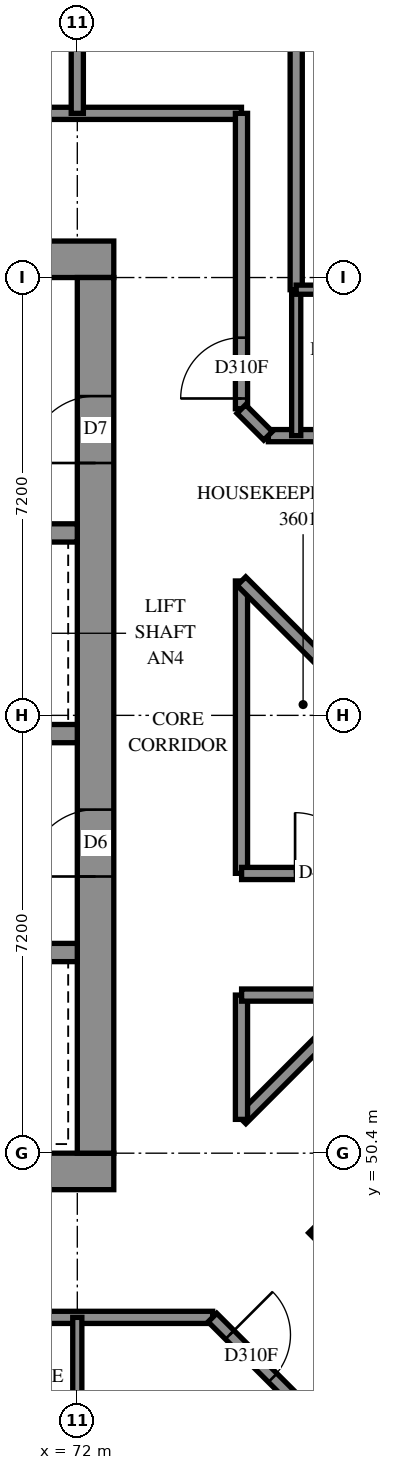
"""IFC4 building model, lengths in metres.
Left out: names, types, materials, properties, quantities, classifications, styles, units other than length and angle.
Written with IfcOpenShell. Run it as: python <this file> out.ifc"""

import sys

from ifc_helpers import new_model, si_unit, direction, frame, frame_2d, origin, place, context, subcontext, project, spatial, rectangle, extrude, element, fill, save


model = new_model("IFC4")
c1 = context("Model", 3, precision=1e-05, world=origin(), true_north=direction((0.0, 1.0)))
c2 = subcontext(c1, "Body", "Model", "MODEL_VIEW")
j1 = project(units=[si_unit("LENGTHUNIT", "METRE"), si_unit("PLANEANGLEUNIT", "RADIAN")], contexts=[c1])
p1 = place(None, origin())
s1 = spatial("IfcSite", under=j1, at=p1, CompositionType="ELEMENT")
p2 = place(p1, origin())
s2 = spatial("IfcBuilding", under=s1, at=p2, CompositionType="ELEMENT")
p3 = place(p2, frame((0.0, 0.0, 135.4)))
s3 = spatial("IfcBuildingStorey", under=s2, at=p3, CompositionType="ELEMENT", Elevation=135.4)
p4 = place(p3, frame((57.0, 50.1, -0.3), z_axis=(0.0, 0.0, 1.0), x_axis=(1.0, 0.0, 0.0)))
e1 = element("IfcWall", 1, at=p4, inside=s3, PredefinedType="SHEAR", context=c2, shape_type="SweptSolid", body=[
    extrude(rectangle(XDim=15.6, YDim=0.6, at=frame_2d((7.8, 0.0))), origin(), (0.0, 0.0, 1.0), 2.7),
])
p5 = place(p3, frame((57.0, 65.1, -0.3), z_axis=(0.0, 0.0, 1.0), x_axis=(1.0, 0.0, 0.0)))
e2 = element("IfcWall", 2, at=p5, inside=s3, PredefinedType="SHEAR", context=c2, shape_type="SweptSolid", body=[
    extrude(rectangle(XDim=15.6, YDim=0.6, at=frame_2d((7.8, 0.0))), origin(), (0.0, 0.0, 1.0), 2.7),
])
p6 = place(p5, frame((10.6, 0.0, 0.3)))
e3 = element("IfcOpeningElement", 3, at=p6, cuts=e2, PredefinedType="OPENING", context=c2, shape_type="SweptSolid", body=[
    extrude(rectangle(XDim=0.8, YDim=2.1, at=frame_2d((0.4, 1.05))), frame((0.0, 0.31, 0.0), z_axis=(0.0, -1.0, 0.0), x_axis=(1.0, 0.0, 0.0)), (0.0, 0.0, 1.0), 0.62),
])
p7 = place(p3, frame((72.3, 50.4, -0.3), z_axis=(0.0, 0.0, 1.0), x_axis=(0.0, 1.0, 0.0)))
e4 = element("IfcWall", 4, at=p7, inside=s3, PredefinedType="SHEAR", context=c2, shape_type="SweptSolid", body=[
    extrude(rectangle(XDim=14.4, YDim=0.6, at=frame_2d((7.2, 0.0))), origin(), (0.0, 0.0, 1.0), 2.7),
])
p8 = place(p7, frame((4.55, 0.0, 0.3)))
e5 = element("IfcOpeningElement", 5, at=p8, cuts=e4, PredefinedType="OPENING", context=c2, shape_type="SweptSolid", body=[
    extrude(rectangle(XDim=1.1, YDim=2.1, at=frame_2d((0.55, 1.05))), frame((0.0, 0.31, 0.0), z_axis=(0.0, -1.0, 0.0), x_axis=(1.0, 0.0, 0.0)), (0.0, 0.0, 1.0), 0.62),
])
p9 = place(p7, frame((11.35, 0.0, 0.3)))
e6 = element("IfcOpeningElement", 6, at=p9, cuts=e4, PredefinedType="OPENING", context=c2, shape_type="SweptSolid", body=[
    extrude(rectangle(XDim=1.1, YDim=2.1, at=frame_2d((0.55, 1.05))), frame((0.0, 0.31, 0.0), z_axis=(0.0, -1.0, 0.0), x_axis=(1.0, 0.0, 0.0)), (0.0, 0.0, 1.0), 0.62),
])
p10 = place(p3, frame((57.6, 53.7, 0.0), z_axis=(0.0, 0.0, 1.0), x_axis=(1.0, 0.0, 0.0)))
e7 = element("IfcWall", 7, at=p10, inside=s3, PredefinedType="SOLIDWALL", context=c2, shape_type="SweptSolid", body=[
    extrude(rectangle(XDim=14.4, YDim=0.3, at=frame_2d((7.2, 0.0))), origin(), (0.0, 0.0, 1.0), 3.1),
])
p11 = place(p10, frame((12.05, 0.0, 0.0)))
e8 = element("IfcOpeningElement", 8, at=p11, cuts=e7, PredefinedType="OPENING", context=c2, shape_type="SweptSolid", body=[
    extrude(rectangle(XDim=1.1, YDim=2.1, at=frame_2d((0.55, 1.05))), frame((0.0, 0.16, 0.0), z_axis=(0.0, -1.0, 0.0), x_axis=(1.0, 0.0, 0.0)), (0.0, 0.0, 1.0), 0.32),
])
p12 = place(p3, frame((57.6, 57.3, 0.0), z_axis=(0.0, 0.0, 1.0), x_axis=(1.0, 0.0, 0.0)))
e9 = element("IfcWall", 9, at=p12, inside=s3, PredefinedType="SOLIDWALL", context=c2, shape_type="SweptSolid", body=[
    extrude(rectangle(XDim=14.4, YDim=0.3, at=frame_2d((7.2, 0.0))), origin(), (0.0, 0.0, 1.0), 3.1),
])
p13 = place(p12, frame((1.25, 0.0, 0.0)))
e10 = element("IfcOpeningElement", 10, at=p13, cuts=e9, PredefinedType="OPENING", context=c2, shape_type="SweptSolid", body=[
    extrude(rectangle(XDim=1.1, YDim=2.1, at=frame_2d((0.55, 1.05))), frame((0.0, 0.16, 0.0), z_axis=(0.0, -1.0, 0.0), x_axis=(1.0, 0.0, 0.0)), (0.0, 0.0, 1.0), 0.32),
])
p14 = place(p12, frame((4.85, 0.0, 0.0)))
e11 = element("IfcOpeningElement", 11, at=p14, cuts=e9, PredefinedType="OPENING", context=c2, shape_type="SweptSolid", body=[
    extrude(rectangle(XDim=1.1, YDim=2.1, at=frame_2d((0.55, 1.05))), frame((0.0, 0.16, 0.0), z_axis=(0.0, -1.0, 0.0), x_axis=(1.0, 0.0, 0.0)), (0.0, 0.0, 1.0), 0.32),
])
p15 = place(p12, frame((8.45, 0.0, 0.0)))
e12 = element("IfcOpeningElement", 12, at=p15, cuts=e9, PredefinedType="OPENING", context=c2, shape_type="SweptSolid", body=[
    extrude(rectangle(XDim=1.1, YDim=2.1, at=frame_2d((0.55, 1.05))), frame((0.0, 0.16, 0.0), z_axis=(0.0, -1.0, 0.0), x_axis=(1.0, 0.0, 0.0)), (0.0, 0.0, 1.0), 0.32),
])
p16 = place(p12, frame((12.05, 0.0, 0.0)))
e13 = element("IfcOpeningElement", 13, at=p16, cuts=e9, PredefinedType="OPENING", context=c2, shape_type="SweptSolid", body=[
    extrude(rectangle(XDim=1.1, YDim=2.1, at=frame_2d((0.55, 1.05))), frame((0.0, 0.16, 0.0), z_axis=(0.0, -1.0, 0.0), x_axis=(1.0, 0.0, 0.0)), (0.0, 0.0, 1.0), 0.32),
])
p17 = place(p3, frame((64.8, 60.6, 0.0), z_axis=(0.0, 0.0, 1.0), x_axis=(1.0, 0.0, 0.0)))
e14 = element("IfcWall", 14, at=p17, inside=s3, PredefinedType="SOLIDWALL", context=c2, shape_type="SweptSolid", body=[
    extrude(rectangle(XDim=7.2, YDim=0.3, at=frame_2d((3.6, 0.0))), origin(), (0.0, 0.0, 1.0), 3.1),
])
p18 = place(p3, frame((76.018, 49.302, -0.3), z_axis=(0.0, 0.0, 1.0), x_axis=(0.7071067812, -0.7071067812, 0.0)))
e15 = element("IfcWall", 15, at=p18, inside=s3, PredefinedType="SHEAR", context=c2, shape_type="SweptSolid", body=[
    extrude(rectangle(XDim=15.6, YDim=0.6, at=frame_2d((7.8, 0.0))), origin(), (0.0, 0.0, 1.0), 2.7),
])
p19 = place(p3, frame((54.9, 67.5, 0.0), z_axis=(0.0, 0.0, 1.0), x_axis=(1.0, 0.0, 0.0)))
e16 = element("IfcWall", 16, at=p19, inside=s3, PredefinedType="PARTITIONING", context=c2, shape_type="SweptSolid", body=[
    extrude(rectangle(XDim=19.8, YDim=0.2, at=frame_2d((9.9, 0.0))), origin(), (0.0, 0.0, 1.0), 3.1),
])
p20 = place(p19, frame((6.562, 0.0, 0.0)))
e17 = element("IfcOpeningElement", 17, at=p20, cuts=e16, PredefinedType="OPENING", context=c2, shape_type="SweptSolid", body=[
    extrude(rectangle(XDim=1.0, YDim=2.1, at=frame_2d((0.5, 1.05))), frame((0.0, 0.11, 0.0), z_axis=(0.0, -1.0, 0.0), x_axis=(1.0, 0.0, 0.0)), (0.0, 0.0, 1.0), 0.22),
])
p21 = place(p19, frame((14.089, 0.0, 0.0)))
e18 = element("IfcOpeningElement", 18, at=p21, cuts=e16, PredefinedType="OPENING", context=c2, shape_type="SweptSolid", body=[
    extrude(rectangle(XDim=1.0, YDim=2.1, at=frame_2d((0.5, 1.05))), frame((0.0, 0.11, 0.0), z_axis=(0.0, -1.0, 0.0), x_axis=(1.0, 0.0, 0.0)), (0.0, 0.0, 1.0), 0.22),
])
p22 = place(p3, frame((54.9, 47.7, 0.0), z_axis=(0.0, 0.0, 1.0), x_axis=(1.0, 0.0, 0.0)))
e19 = element("IfcWall", 19, at=p22, inside=s3, PredefinedType="PARTITIONING", context=c2, shape_type="SweptSolid", body=[
    extrude(rectangle(XDim=19.326, YDim=0.2, at=frame_2d((9.663, 0.0))), origin(), (0.0, 0.0, 1.0), 3.1),
])
p23 = place(p22, frame((5.0, 0.0, 0.0)))
e20 = element("IfcOpeningElement", 20, at=p23, cuts=e19, PredefinedType="OPENING", context=c2, shape_type="SweptSolid", body=[
    extrude(rectangle(XDim=0.9, YDim=2.1, at=frame_2d((0.45, 1.05))), frame((0.0, 0.11, 0.0), z_axis=(0.0, -1.0, 0.0), x_axis=(1.0, 0.0, 0.0)), (0.0, 0.0, 1.0), 0.22),
])
p24 = place(p22, frame((12.2, 0.0, 0.0)))
e21 = element("IfcOpeningElement", 21, at=p24, cuts=e19, PredefinedType="OPENING", context=c2, shape_type="SweptSolid", body=[
    extrude(rectangle(XDim=0.9, YDim=2.1, at=frame_2d((0.45, 1.05))), frame((0.0, 0.11, 0.0), z_axis=(0.0, -1.0, 0.0), x_axis=(1.0, 0.0, 0.0)), (0.0, 0.0, 1.0), 0.22),
])
p25 = place(p22, frame((6.7, 0.0, 0.0)))
e22 = element("IfcOpeningElement", 22, at=p25, cuts=e19, PredefinedType="OPENING", context=c2, shape_type="SweptSolid", body=[
    extrude(rectangle(XDim=0.9, YDim=2.1, at=frame_2d((0.45, 1.05))), frame((0.0, 0.11, 0.0), z_axis=(0.0, -1.0, 0.0), x_axis=(1.0, 0.0, 0.0)), (0.0, 0.0, 1.0), 0.22),
])
p26 = place(p22, frame((13.9, 0.0, 0.0)))
e23 = element("IfcOpeningElement", 23, at=p26, cuts=e19, PredefinedType="OPENING", context=c2, shape_type="SweptSolid", body=[
    extrude(rectangle(XDim=0.9, YDim=2.1, at=frame_2d((0.45, 1.05))), frame((0.0, 0.11, 0.0), z_axis=(0.0, -1.0, 0.0), x_axis=(1.0, 0.0, 0.0)), (0.0, 0.0, 1.0), 0.22),
])
p27 = place(p3, frame((75.6, 64.6, 0.0), z_axis=(0.0, 0.0, 1.0), x_axis=(0.0, 1.0, 0.0)))
e24 = element("IfcWall", 24, at=p27, inside=s3, PredefinedType="PARTITIONING", context=c2, shape_type="SweptSolid", body=[
    extrude(rectangle(XDim=8.153, YDim=0.2, at=frame_2d((4.076, 0.0))), origin(), (0.0, 0.0, 1.0), 3.1),
])
p28 = place(p3, frame((74.7, 62.642, 0.0), z_axis=(0.0, 0.0, 1.0), x_axis=(0.0, 1.0, 0.0)))
e25 = element("IfcWall", 25, at=p28, inside=s3, PredefinedType="PARTITIONING", context=c2, shape_type="SweptSolid", body=[
    extrude(rectangle(XDim=4.858, YDim=0.2, at=frame_2d((2.429, 0.0))), origin(), (0.0, 0.0, 1.0), 3.1),
])
p29 = place(p28, frame((0.169, 0.0, 0.0)))
e26 = element("IfcOpeningElement", 26, at=p29, cuts=e25, PredefinedType="OPENING", context=c2, shape_type="SweptSolid", body=[
    extrude(rectangle(XDim=1.0, YDim=2.1, at=frame_2d((0.5, 1.05))), frame((0.0, 0.11, 0.0), z_axis=(0.0, -1.0, 0.0), x_axis=(1.0, 0.0, 0.0)), (0.0, 0.0, 1.0), 0.22),
])
p30 = place(p3, frame((74.7, 55.002, 0.0), z_axis=(0.0, 0.0, 1.0), x_axis=(0.0, 1.0, 0.0)))
e27 = element("IfcWall", 27, at=p30, inside=s3, PredefinedType="PARTITIONING", context=c2, shape_type="SweptSolid", body=[
    extrude(rectangle(XDim=4.808, YDim=0.2, at=frame_2d((2.404, 0.0))), origin(), (0.0, 0.0, 1.0), 3.1),
])
p31 = place(p3, frame((74.223, 47.697, 0.0), z_axis=(0.0, 0.0, 1.0), x_axis=(0.7071067812, -0.7071067812, 0.0)))
e28 = element("IfcWall", 28, at=p31, inside=s3, PredefinedType="PARTITIONING", context=c2, shape_type="SweptSolid", body=[
    extrude(rectangle(XDim=4.63, YDim=0.2, at=frame_2d((2.315, 0.0))), origin(), (0.0, 0.0, 1.0), 3.1),
])
p32 = place(p31, frame((0.401, 0.0, 0.0)))
e29 = element("IfcOpeningElement", 29, at=p32, cuts=e28, PredefinedType="OPENING", context=c2, shape_type="SweptSolid", body=[
    extrude(rectangle(XDim=1.0, YDim=2.1, at=frame_2d((0.5, 1.05))), frame((0.0, 0.11, 0.0), z_axis=(0.0, -1.0, 0.0), x_axis=(1.0, 0.0, 0.0)), (0.0, 0.0, 1.0), 0.22),
])
p33 = place(p3, frame((75.142, 62.2, 0.0), z_axis=(0.0, 0.0, 1.0), x_axis=(1.0, 0.0, 0.0)))
e30 = element("IfcWall", 30, at=p33, inside=s3, PredefinedType="PARTITIONING", context=c2, shape_type="SweptSolid", body=[
    extrude(rectangle(XDim=4.058, YDim=0.2, at=frame_2d((2.029, 0.0))), origin(), (0.0, 0.0, 1.0), 3.1),
])
p34 = place(p33, frame((2.758, 0.0, 0.0)))
e31 = element("IfcOpeningElement", 31, at=p34, cuts=e30, PredefinedType="OPENING", context=c2, shape_type="SweptSolid", body=[
    extrude(rectangle(XDim=0.9, YDim=2.1, at=frame_2d((0.45, 1.05))), frame((0.0, 0.11, 0.0), z_axis=(0.0, -1.0, 0.0), x_axis=(1.0, 0.0, 0.0)), (0.0, 0.0, 1.0), 0.22),
])
p35 = place(p3, frame((74.702, 55.0, 0.0), z_axis=(0.0, 0.0, 1.0), x_axis=(1.0, 0.0, 0.0)))
e32 = element("IfcWall", 32, at=p35, inside=s3, PredefinedType="PARTITIONING", context=c2, shape_type="SweptSolid", body=[
    extrude(rectangle(XDim=4.044, YDim=0.2, at=frame_2d((2.022, 0.0))), origin(), (0.0, 0.0, 1.0), 3.1),
])
p36 = place(p35, frame((0.879, 0.0, 0.0)))
e33 = element("IfcOpeningElement", 33, at=p36, cuts=e32, PredefinedType="OPENING", context=c2, shape_type="SweptSolid", body=[
    extrude(rectangle(XDim=1.0, YDim=2.1, at=frame_2d((0.5, 1.05))), frame((0.0, 0.11, 0.0), z_axis=(0.0, -1.0, 0.0), x_axis=(1.0, 0.0, 0.0)), (0.0, 0.0, 1.0), 0.22),
])
p37 = place(p3, frame((74.699, 59.807, 0.0), z_axis=(0.0, 0.0, 1.0), x_axis=(0.7071067812, -0.7071067812, 0.0)))
e34 = element("IfcWall", 34, at=p37, inside=s3, PredefinedType="PARTITIONING", context=c2, shape_type="SweptSolid", body=[
    extrude(rectangle(XDim=3.957, YDim=0.2, at=frame_2d((1.978, 0.0))), origin(), (0.0, 0.0, 1.0), 3.1),
])
p38 = place(p3, frame((72.0, 67.5, 0.0), z_axis=(0.0, 0.0, 1.0), x_axis=(0.0, 1.0, 0.0)))
e35 = element("IfcWall", 35, at=p38, inside=s3, PredefinedType="PARTITIONING", context=c2, shape_type="SweptSolid", body=[
    extrude(rectangle(XDim=3.946, YDim=0.2, at=frame_2d((1.973, 0.0))), origin(), (0.0, 0.0, 1.0), 3.1),
])
p39 = place(p3, frame((74.701, 50.957, 0.0), z_axis=(0.0, 0.0, 1.0), x_axis=(0.7071067812, 0.7071067812, 0.0)))
e36 = element("IfcWall", 36, at=p39, inside=s3, PredefinedType="PARTITIONING", context=c2, shape_type="SweptSolid", body=[
    extrude(rectangle(XDim=2.888, YDim=0.2, at=frame_2d((1.444, 0.0))), origin(), (0.0, 0.0, 1.0), 3.1),
])
for number, where, z_axis, x_axis in (
    (37, (72.0, 45.3, 0.0), (0.0, 0.0, 1.0), (0.0, 1.0, 0.0)),
    (38, (75.6, 62.2, 0.0), (0.0, 0.0, 1.0), (0.0, 1.0, 0.0)),
):
    element("IfcWall", number, at=place(p3, frame(where, z_axis=z_axis, x_axis=x_axis)), inside=s3, PredefinedType="PARTITIONING", context=c2, shape_type="SweptSolid", body=[
        extrude(rectangle(XDim=2.4, YDim=0.15, at=frame_2d((1.2, 0.0))), origin(), (0.0, 0.0, 1.0), 3.1),
    ])
p40 = place(p3, frame((74.7, 50.956, 0.0), z_axis=(0.0, 0.0, 1.0), x_axis=(0.0, 1.0, 0.0)))
e39 = element("IfcWall", 39, at=p40, inside=s3, PredefinedType="PARTITIONING", context=c2, shape_type="SweptSolid", body=[
    extrude(rectangle(XDim=2.044, YDim=0.2, at=frame_2d((1.022, 0.0))), origin(), (0.0, 0.0, 1.0), 3.1),
])
p41 = place(p3, frame((74.702, 53.0, 0.0), z_axis=(0.0, 0.0, 1.0), x_axis=(1.0, 0.0, 0.0)))
e40 = element("IfcWall", 40, at=p41, inside=s3, PredefinedType="PARTITIONING", context=c2, shape_type="SweptSolid", body=[
    extrude(rectangle(XDim=2.042, YDim=0.2, at=frame_2d((1.021, 0.0))), origin(), (0.0, 0.0, 1.0), 3.1),
])
p42 = place(p3, frame((75.6, 64.6, 0.0), z_axis=(0.0, 0.0, 1.0), x_axis=(1.0, 0.0, 0.0)))
e41 = element("IfcWall", 41, at=p42, inside=s3, PredefinedType="PARTITIONING", context=c2, shape_type="SweptSolid", body=[
    extrude(rectangle(XDim=1.9, YDim=0.15, at=frame_2d((0.95, 0.0))), origin(), (0.0, 0.0, 1.0), 3.1),
])
p43 = place(p42, frame((0.607, 0.0, 0.0)))
e42 = element("IfcOpeningElement", 42, at=p43, cuts=e41, PredefinedType="OPENING", context=c2, shape_type="SweptSolid", body=[
    extrude(rectangle(XDim=0.8, YDim=2.1, at=frame_2d((0.4, 1.05))), frame((0.0, 0.085, 0.0), z_axis=(0.0, -1.0, 0.0), x_axis=(1.0, 0.0, 0.0)), (0.0, 0.0, 1.0), 0.17),
])
p44 = place(p3, frame((74.697, 62.637, 0.0), z_axis=(0.0, 0.0, 1.0), x_axis=(0.7071067812, -0.7071067812, 0.0)))
e43 = element("IfcWall", 43, at=p44, inside=s3, PredefinedType="PARTITIONING", context=c2, shape_type="SweptSolid", body=[
    extrude(rectangle(XDim=0.622, YDim=0.2, at=frame_2d((0.311, 0.0))), origin(), (0.0, 0.0, 1.0), 3.1),
])
p45 = place(p8, origin())
e44 = element("IfcDoor", 44, at=p45, inside=s3, OperationType="DOUBLE_DOOR_SINGLE_SWING", PredefinedType="DOOR", context=c2, shape_type="SweptSolid", body=[
    extrude(rectangle(XDim=1.1, YDim=2.1, at=frame_2d((0.55, 1.05))), frame((0.0, 0.025, 0.0), z_axis=(0.0, -1.0, 0.0), x_axis=(1.0, 0.0, 0.0)), (0.0, 0.0, 1.0), 0.05),
])
fill(e5, e44)
p46 = place(p9, origin())
e45 = element("IfcDoor", 45, at=p46, inside=s3, OperationType="SINGLE_SWING_RIGHT", PredefinedType="DOOR", context=c2, shape_type="SweptSolid", body=[
    extrude(rectangle(XDim=1.1, YDim=2.1, at=frame_2d((0.55, 1.05))), frame((0.0, 0.025, 0.0), z_axis=(0.0, -1.0, 0.0), x_axis=(1.0, 0.0, 0.0)), (0.0, 0.0, 1.0), 0.05),
])
fill(e6, e45)
p47 = place(p36, origin())
e46 = element("IfcDoor", 46, at=p47, inside=s3, OperationType="SINGLE_SWING_LEFT", PredefinedType="DOOR", context=c2, shape_type="SweptSolid", body=[
    extrude(rectangle(XDim=1.0, YDim=2.1, at=frame_2d((0.5, 1.05))), frame((0.0, 0.025, 0.0), z_axis=(0.0, -1.0, 0.0), x_axis=(1.0, 0.0, 0.0)), (0.0, 0.0, 1.0), 0.05),
])
fill(e33, e46)
p48 = place(p29, origin())
e47 = element("IfcDoor", 47, at=p48, inside=s3, OperationType="SINGLE_SWING_RIGHT", PredefinedType="DOOR", context=c2, shape_type="SweptSolid", body=[
    extrude(rectangle(XDim=1.0, YDim=2.1, at=frame_2d((0.5, 1.05))), frame((0.0, 0.025, 0.0), z_axis=(0.0, -1.0, 0.0), x_axis=(1.0, 0.0, 0.0)), (0.0, 0.0, 1.0), 0.05),
])
fill(e26, e47)
p49 = place(p32, origin())
e48 = element("IfcDoor", 48, at=p49, inside=s3, OperationType="SINGLE_SWING_LEFT", PredefinedType="DOOR", context=c2, shape_type="SweptSolid", body=[
    extrude(rectangle(XDim=1.0, YDim=2.1, at=frame_2d((0.5, 1.05))), frame((0.0, 0.025, 0.0), z_axis=(0.0, -1.0, 0.0), x_axis=(1.0, 0.0, 0.0)), (0.0, 0.0, 1.0), 0.05),
])
fill(e29, e48)
save(model, sys.argv[1])
